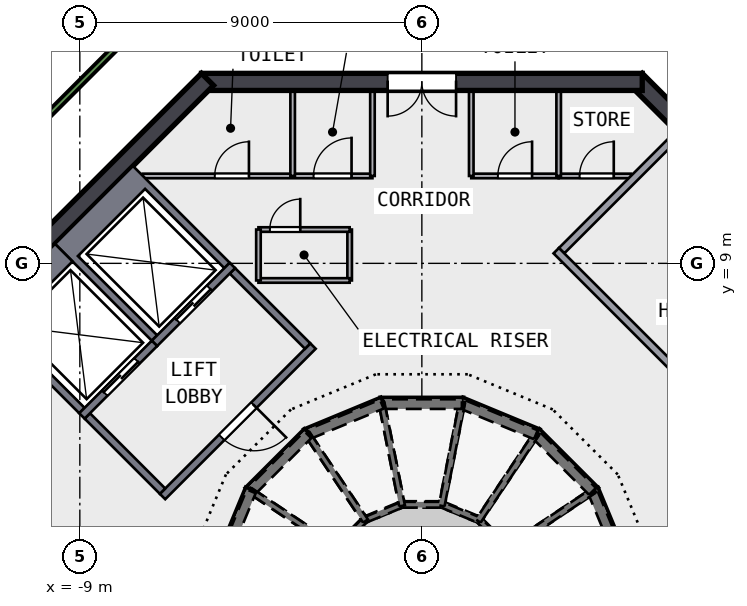
"""IFC4 building model, lengths in metres.
Left out: names, types, materials, properties, quantities, classifications, styles, units other than length and angle.
Written with IfcOpenShell. Run it as: python <this file> out.ifc"""

import sys

from ifc_helpers import new_model, si_unit, direction, frame, frame_2d, origin, place, context, subcontext, project, spatial, polyline, rectangle, outline, extrude, element, fill, save


model = new_model("IFC4")
c1 = context("Model", 3, precision=1e-05, world=origin(), true_north=direction((0.0, 1.0)))
c2 = subcontext(c1, "Body", "Model", "MODEL_VIEW")
j1 = project(units=[si_unit("LENGTHUNIT", "METRE"), si_unit("PLANEANGLEUNIT", "RADIAN")], contexts=[c1])
p1 = place(None, origin())
s1 = spatial("IfcSite", under=j1, at=p1, CompositionType="ELEMENT")
p2 = place(p1, origin())
s2 = spatial("IfcBuilding", under=s1, at=p2, CompositionType="ELEMENT")
p3 = place(p2, frame((0.0, 0.0, 315.0)))
s3 = spatial("IfcBuildingStorey", under=s2, at=p3, CompositionType="ELEMENT", Elevation=315.0)
p4 = place(p3, frame((13.841, 5.64, 0.0), z_axis=(0.0, 0.0, 1.0), x_axis=(-0.707106781, 0.707106781, 0.0)))
e1 = element("IfcWall", 1, at=p4, inside=s3, PredefinedType="SHEAR", context=c2, shape_type="SweptSolid", body=[
    extrude(rectangle(XDim=11.598, YDim=0.45, at=frame_2d((5.799, 0.0))), origin(), (0.0, 0.0, 1.0), 7.5),
])
p5 = place(p3, frame((5.799, 13.775, 0.0), z_axis=(0.0, 0.0, 1.0), x_axis=(-1.0, 0.0, 0.0)))
e2 = element("IfcWall", 2, at=p5, inside=s3, PredefinedType="SHEAR", context=c2, shape_type="SweptSolid", body=[
    extrude(rectangle(XDim=11.598, YDim=0.45, at=frame_2d((5.799, 0.0))), origin(), (0.0, 0.0, 1.0), 7.5),
])
p6 = place(p5, frame((4.899, 0.0, 0.0)))
e3 = element("IfcOpeningElement", 3, at=p6, cuts=e2, PredefinedType="OPENING", context=c2, shape_type="SweptSolid", body=[
    extrude(rectangle(XDim=1.8, YDim=2.1, at=frame_2d((0.9, 1.05))), frame((0.0, 0.235, 0.0), z_axis=(0.0, -1.0, 0.0), x_axis=(1.0, 0.0, 0.0)), (0.0, 0.0, 1.0), 0.47),
])
p7 = place(p3, frame((-5.64, 13.841, 0.0), z_axis=(0.0, 0.0, 1.0), x_axis=(-0.707106781, -0.707106781, 0.0)))
e4 = element("IfcWall", 4, at=p7, inside=s3, PredefinedType="SHEAR", context=c2, shape_type="SweptSolid", body=[
    extrude(rectangle(XDim=11.598, YDim=0.45, at=frame_2d((5.799, 0.0))), origin(), (0.0, 0.0, 1.0), 7.5),
])
p8 = place(p3, origin())
e5 = element("IfcWall", 5, at=p8, inside=s3, PredefinedType="SOLIDWALL", context=c2, shape_type="SweptSolid", body=[
    extrude(outline(polyline([(5.471, 1.088), (4.638, 3.099), (4.342, 2.901), (5.121, 1.019), (5.471, 1.088)])), origin(), (0.0, 0.0, 1.0), 1.12),
])
p9 = place(p3, origin())
e6 = element("IfcWall", 6, at=p9, inside=s3, PredefinedType="SOLIDWALL", context=c2, shape_type="SweptSolid", body=[
    extrude(outline(polyline([(4.638, 3.099), (3.099, 4.638), (2.901, 4.342), (4.342, 2.901), (4.638, 3.099)])), origin(), (0.0, 0.0, 1.0), 1.12),
])
p10 = place(p3, origin())
e7 = element("IfcWall", 7, at=p10, inside=s3, PredefinedType="SOLIDWALL", context=c2, shape_type="SweptSolid", body=[
    extrude(outline(polyline([(3.099, 4.638), (1.088, 5.471), (1.019, 5.121), (2.901, 4.342), (3.099, 4.638)])), origin(), (0.0, 0.0, 1.0), 1.12),
])
p11 = place(p3, origin())
e8 = element("IfcWall", 8, at=p11, inside=s3, PredefinedType="SOLIDWALL", context=c2, shape_type="SweptSolid", body=[
    extrude(outline(polyline([(1.088, 5.471), (-1.088, 5.471), (-1.019, 5.121), (1.019, 5.121), (1.088, 5.471)])), origin(), (0.0, 0.0, 1.0), 1.12),
])
p12 = place(p3, origin())
e9 = element("IfcWall", 9, at=p12, inside=s3, PredefinedType="SOLIDWALL", context=c2, shape_type="SweptSolid", body=[
    extrude(outline(polyline([(-1.088, 5.471), (-3.099, 4.638), (-2.901, 4.342), (-1.019, 5.121), (-1.088, 5.471)])), origin(), (0.0, 0.0, 1.0), 1.12),
])
p13 = place(p3, origin())
e10 = element("IfcWall", 10, at=p13, inside=s3, PredefinedType="SOLIDWALL", context=c2, shape_type="SweptSolid", body=[
    extrude(outline(polyline([(-3.099, 4.638), (-4.638, 3.099), (-4.342, 2.901), (-2.901, 4.342), (-3.099, 4.638)])), origin(), (0.0, 0.0, 1.0), 1.12),
])
p14 = place(p3, origin())
e11 = element("IfcWall", 11, at=p14, inside=s3, PredefinedType="SOLIDWALL", context=c2, shape_type="SweptSolid", body=[
    extrude(outline(polyline([(-4.638, 3.099), (-5.471, 1.088), (-5.121, 1.019), (-4.342, 2.901), (-4.638, 3.099)])), origin(), (0.0, 0.0, 1.0), 1.12),
])
p15 = place(p3, origin())
e12 = element("IfcWall", 12, at=p15, inside=s3, PredefinedType="SOLIDWALL", context=c2, shape_type="SweptSolid", body=[
    extrude(outline(polyline([(-10.5, 12.127), (-6.627, 16.0), (-6.689, 16.15), (-10.35, 12.49), (-10.5, 12.127)])), origin(), (0.0, 0.0, 1.0), 0.6),
])
p16 = place(p3, frame((-7.342, 11.3, 0.0), z_axis=(0.0, 0.0, 1.0), x_axis=(1.0, 0.0, 0.0)))
e13 = element("IfcWall", 13, at=p16, inside=s3, PredefinedType="PARTITIONING", context=c2, shape_type="SweptSolid", body=[
    extrude(rectangle(XDim=6.042, YDim=0.12, at=frame_2d((3.021, 0.0))), origin(), (0.0, 0.0, 1.0), 3.0),
])
p17 = place(p16, frame((1.892, 0.0, 0.0)))
e14 = element("IfcOpeningElement", 14, at=p17, cuts=e13, PredefinedType="OPENING", context=c2, shape_type="SweptSolid", body=[
    extrude(rectangle(XDim=0.9, YDim=2.1, at=frame_2d((0.45, 1.05))), frame((0.0, 0.07, 0.0), z_axis=(0.0, -1.0, 0.0), x_axis=(1.0, 0.0, 0.0)), (0.0, 0.0, 1.0), 0.14),
])
p18 = place(p16, frame((4.492, 0.0, 0.0)))
e15 = element("IfcOpeningElement", 15, at=p18, cuts=e13, PredefinedType="OPENING", context=c2, shape_type="SweptSolid", body=[
    extrude(rectangle(XDim=1.0, YDim=2.1, at=frame_2d((0.5, 1.05))), frame((0.0, 0.07, 0.0), z_axis=(0.0, -1.0, 0.0), x_axis=(1.0, 0.0, 0.0)), (0.0, 0.0, 1.0), 0.14),
])
p19 = place(p3, frame((1.3, 11.3, 0.0), z_axis=(0.0, 0.0, 1.0), x_axis=(1.0, 0.0, 0.0)))
e16 = element("IfcWall", 16, at=p19, inside=s3, PredefinedType="PARTITIONING", context=c2, shape_type="SweptSolid", body=[
    extrude(rectangle(XDim=2.3, YDim=0.12, at=frame_2d((1.15, 0.0))), origin(), (0.0, 0.0, 1.0), 3.0),
])
p20 = place(p19, frame((0.7, 0.0, 0.0)))
e17 = element("IfcOpeningElement", 17, at=p20, cuts=e16, PredefinedType="OPENING", context=c2, shape_type="SweptSolid", body=[
    extrude(rectangle(XDim=0.9, YDim=2.1, at=frame_2d((0.45, 1.05))), frame((0.0, 0.07, 0.0), z_axis=(0.0, -1.0, 0.0), x_axis=(1.0, 0.0, 0.0)), (0.0, 0.0, 1.0), 0.14),
])
p21 = place(p3, frame((3.6, 11.3, 0.0), z_axis=(0.0, 0.0, 1.0), x_axis=(1.0, 0.0, 0.0)))
e18 = element("IfcWall", 18, at=p21, inside=s3, PredefinedType="PARTITIONING", context=c2, shape_type="SweptSolid", body=[
    extrude(rectangle(XDim=1.903, YDim=0.12, at=frame_2d((0.952, 0.0))), origin(), (0.0, 0.0, 1.0), 3.0),
])
p22 = place(p21, frame((0.55, 0.0, 0.0)))
e19 = element("IfcOpeningElement", 19, at=p22, cuts=e18, PredefinedType="OPENING", context=c2, shape_type="SweptSolid", body=[
    extrude(rectangle(XDim=0.9, YDim=2.1, at=frame_2d((0.45, 1.05))), frame((0.0, 0.07, 0.0), z_axis=(0.0, -1.0, 0.0), x_axis=(1.0, 0.0, 0.0)), (0.0, 0.0, 1.0), 0.14),
])
for number, where, z_axis, x_axis in (
    (20, (-1.3, 11.3, 0.0), (0.0, 0.0, 1.0), (0.0, 1.0, 0.0)),
    (21, (1.3, 11.3, 0.0), (0.0, 0.0, 1.0), (0.0, 1.0, 0.0)),
    (22, (-3.4, 11.3, 0.0), (0.0, 0.0, 1.0), (0.0, 1.0, 0.0)),
    (23, (3.6, 11.3, 0.0), (0.0, 0.0, 1.0), (0.0, 1.0, 0.0)),
):
    element("IfcWall", number, at=place(p3, frame(where, z_axis=z_axis, x_axis=x_axis)), inside=s3, PredefinedType="PARTITIONING", context=c2, shape_type="SweptSolid", body=[
        extrude(rectangle(XDim=2.251, YDim=0.12, at=frame_2d((1.125, 0.0))), origin(), (0.0, 0.0, 1.0), 3.0),
    ])
p23 = place(p3, frame((-4.3, 9.89, 0.0), z_axis=(0.0, 0.0, 1.0), x_axis=(1.0, 0.0, 0.0)))
e24 = element("IfcWall", 24, at=p23, inside=s3, PredefinedType="PARTITIONING", context=c2, shape_type="SweptSolid", body=[
    extrude(rectangle(XDim=2.4, YDim=0.12, at=frame_2d((1.2, 0.0))), origin(), (0.0, 0.0, 1.0), 3.0),
])
p24 = place(p23, frame((0.3, 0.0, 0.0)))
e25 = element("IfcOpeningElement", 25, at=p24, cuts=e24, PredefinedType="OPENING", context=c2, shape_type="SweptSolid", body=[
    extrude(rectangle(XDim=0.8, YDim=2.1, at=frame_2d((0.4, 1.05))), frame((0.0, 0.07, 0.0), z_axis=(0.0, -1.0, 0.0), x_axis=(1.0, 0.0, 0.0)), (0.0, 0.0, 1.0), 0.14),
])
for number, where, z_axis, x_axis in (
    (26, (-4.3, 9.89, 0.0), (0.0, 0.0, 1.0), (0.0, -1.0, 0.0)),
    (27, (-1.9, 9.89, 0.0), (0.0, 0.0, 1.0), (0.0, -1.0, 0.0)),
):
    element("IfcWall", number, at=place(p3, frame(where, z_axis=z_axis, x_axis=x_axis)), inside=s3, PredefinedType="PARTITIONING", context=c2, shape_type="SweptSolid", body=[
        extrude(rectangle(XDim=1.34, YDim=0.12, at=frame_2d((0.67, 0.0))), origin(), (0.0, 0.0, 1.0), 3.0),
    ])
p25 = place(p3, frame((-4.3, 8.55, 0.0), z_axis=(0.0, 0.0, 1.0), x_axis=(1.0, 0.0, 0.0)))
e28 = element("IfcWall", 28, at=p25, inside=s3, PredefinedType="PARTITIONING", context=c2, shape_type="SweptSolid", body=[
    extrude(rectangle(XDim=2.4, YDim=0.12, at=frame_2d((1.2, 0.0))), origin(), (0.0, 0.0, 1.0), 3.0),
])
p26 = place(p3, origin())
e29 = element("IfcWall", 29, at=p26, inside=s3, PredefinedType="SOLIDWALL", context=c2, shape_type="SweptSolid", body=[
    extrude(outline(polyline([(-9.652, 9.51), (-7.601, 11.561), (-5.056, 9.016), (-5.197, 8.874), (-7.283, 10.96), (-9.051, 9.192), (-6.965, 7.106), (-7.106, 6.965), (-9.652, 9.51)])), origin(), (0.0, 0.0, 1.0), 4.8),
])
p27 = place(p3, frame((-4.985, 8.945, 0.0), z_axis=(0.0, 0.0, 1.0), x_axis=(-0.707106781, -0.707106781, 0.0)))
e30 = element("IfcWall", 30, at=p27, inside=s3, PredefinedType="SOLIDWALL", context=c2, shape_type="SweptSolid", body=[
    extrude(rectangle(XDim=2.9, YDim=0.2, at=frame_2d((1.45, 0.0))), origin(), (0.0, 0.0, 1.0), 4.8),
])
p28 = place(p27, frame((0.85, 0.0, 0.0)))
e31 = element("IfcOpeningElement", 31, at=p28, cuts=e30, PredefinedType="OPENING", context=c2, shape_type="SweptSolid", body=[
    extrude(rectangle(XDim=1.2, YDim=2.1, at=frame_2d((0.6, 1.05))), frame((0.0, 0.11, 0.0), z_axis=(0.0, -1.0, 0.0), x_axis=(1.0, 0.0, 0.0)), (0.0, 0.0, 1.0), 0.22),
])
p29 = place(p3, origin())
e32 = element("IfcWall", 32, at=p29, inside=s3, PredefinedType="SOLIDWALL", context=c2, shape_type="SweptSolid", body=[
    extrude(outline(polyline([(-11.561, 7.601), (-9.652, 9.51), (-9.192, 9.051), (-10.96, 7.283), (-8.874, 5.197), (-9.016, 5.056), (-11.561, 7.601)])), origin(), (0.0, 0.0, 1.0), 4.8),
])
p30 = place(p3, frame((-7.036, 6.894, 0.0), z_axis=(0.0, 0.0, 1.0), x_axis=(-0.707106781, -0.707106781, 0.0)))
e33 = element("IfcWall", 33, at=p30, inside=s3, PredefinedType="SOLIDWALL", context=c2, shape_type="SweptSolid", body=[
    extrude(rectangle(XDim=2.7, YDim=0.2, at=frame_2d((1.35, 0.0))), origin(), (0.0, 0.0, 1.0), 4.8),
])
p31 = place(p30, frame((0.65, 0.0, 0.0)))
e34 = element("IfcOpeningElement", 34, at=p31, cuts=e33, PredefinedType="OPENING", context=c2, shape_type="SweptSolid", body=[
    extrude(rectangle(XDim=1.2, YDim=2.1, at=frame_2d((0.6, 1.05))), frame((0.0, 0.11, 0.0), z_axis=(0.0, -1.0, 0.0), x_axis=(1.0, 0.0, 0.0)), (0.0, 0.0, 1.0), 0.22),
])
p32 = place(p3, frame((3.535, 9.334, 0.0), z_axis=(0.0, 0.0, 1.0), x_axis=(0.707106781, -0.707106781, 0.0)))
e35 = element("IfcWall", 35, at=p32, inside=s3, PredefinedType="SOLIDWALL", context=c2, shape_type="SweptSolid", body=[
    extrude(rectangle(XDim=8.2, YDim=0.2, at=frame_2d((4.1, 0.0))), origin(), (0.0, 0.0, 1.0), 3.6),
])
p33 = place(p32, frame((6.6, 0.0, 0.0)))
e36 = element("IfcOpeningElement", 36, at=p33, cuts=e35, PredefinedType="OPENING", context=c2, shape_type="SweptSolid", body=[
    extrude(rectangle(XDim=1.2, YDim=2.1, at=frame_2d((0.6, 1.05))), frame((0.0, 0.11, 0.0), z_axis=(0.0, -1.0, 0.0), x_axis=(1.0, 0.0, 0.0)), (0.0, 0.0, 1.0), 0.22),
])
p34 = place(p3, frame((3.677, 9.334, 0.0), z_axis=(0.0, 0.0, 1.0), x_axis=(0.707106781, 0.707106781, 0.0)))
e37 = element("IfcWall", 37, at=p34, inside=s3, PredefinedType="SOLIDWALL", context=c2, shape_type="SweptSolid", body=[
    extrude(rectangle(XDim=4.35, YDim=0.2, at=frame_2d((2.175, 0.0))), origin(), (0.0, 0.0, 1.0), 3.6),
])
p35 = place(p3, frame((-2.864, 6.823, 0.0), z_axis=(0.0, 0.0, 1.0), x_axis=(-0.707106781, -0.707106781, 0.0)))
e38 = element("IfcWall", 38, at=p35, inside=s3, PredefinedType="SOLIDWALL", context=c2, shape_type="SweptSolid", body=[
    extrude(rectangle(XDim=5.6, YDim=0.2, at=frame_2d((2.8, 0.0))), origin(), (0.0, 0.0, 1.0), 4.8),
])
p36 = place(p35, frame((2.2, 0.0, 0.0)))
e39 = element("IfcOpeningElement", 39, at=p36, cuts=e38, PredefinedType="OPENING", context=c2, shape_type="SweptSolid", body=[
    extrude(rectangle(XDim=1.2, YDim=2.1, at=frame_2d((0.6, 1.05))), frame((0.0, 0.11, 0.0), z_axis=(0.0, -1.0, 0.0), x_axis=(1.0, 0.0, 0.0)), (0.0, 0.0, 1.0), 0.22),
])
for number, where, z_axis, x_axis in (
    (40, (-3.005, 6.823, 0.0), (0.0, 0.0, 1.0), (-0.707, 0.707, 0.0)),
    (41, (-6.823, 3.005, 0.0), (0.0, 0.0, 1.0), (-0.707, 0.707, 0.0)),
):
    element("IfcWall", number, at=place(p3, frame(where, z_axis=z_axis, x_axis=x_axis)), inside=s3, PredefinedType="SOLIDWALL", context=c2, shape_type="SweptSolid", body=[
        extrude(rectangle(XDim=2.8, YDim=0.2, at=frame_2d((1.4, 0.0))), origin(), (0.0, 0.0, 1.0), 4.8),
    ])
p37 = place(p6, origin())
e42 = element("IfcDoor", 42, at=p37, inside=s3, OperationType="DOUBLE_DOOR_SINGLE_SWING", PredefinedType="DOOR", context=c2, shape_type="SweptSolid", body=[
    extrude(rectangle(XDim=1.8, YDim=2.1, at=frame_2d((0.9, 1.05))), frame((0.0, 0.025, 0.0), z_axis=(0.0, -1.0, 0.0), x_axis=(1.0, 0.0, 0.0)), (0.0, 0.0, 1.0), 0.05),
])
fill(e3, e42)
p38 = place(p17, origin())
e43 = element("IfcDoor", 43, at=p38, inside=s3, OperationType="SINGLE_SWING_RIGHT", PredefinedType="DOOR", context=c2, shape_type="SweptSolid", body=[
    extrude(rectangle(XDim=0.9, YDim=2.1, at=frame_2d((0.45, 1.05))), frame((0.0, 0.025, 0.0), z_axis=(0.0, -1.0, 0.0), x_axis=(1.0, 0.0, 0.0)), (0.0, 0.0, 1.0), 0.05),
])
fill(e14, e43)
p39 = place(p18, origin())
e44 = element("IfcDoor", 44, at=p39, inside=s3, OperationType="SINGLE_SWING_RIGHT", PredefinedType="DOOR", context=c2, shape_type="SweptSolid", body=[
    extrude(rectangle(XDim=1.0, YDim=2.1, at=frame_2d((0.5, 1.05))), frame((0.0, 0.025, 0.0), z_axis=(0.0, -1.0, 0.0), x_axis=(1.0, 0.0, 0.0)), (0.0, 0.0, 1.0), 0.05),
])
fill(e15, e44)
p40 = place(p20, origin())
e45 = element("IfcDoor", 45, at=p40, inside=s3, OperationType="SINGLE_SWING_RIGHT", PredefinedType="DOOR", context=c2, shape_type="SweptSolid", body=[
    extrude(rectangle(XDim=0.9, YDim=2.1, at=frame_2d((0.45, 1.05))), frame((0.0, 0.025, 0.0), z_axis=(0.0, -1.0, 0.0), x_axis=(1.0, 0.0, 0.0)), (0.0, 0.0, 1.0), 0.05),
])
fill(e17, e45)
p41 = place(p22, origin())
e46 = element("IfcDoor", 46, at=p41, inside=s3, OperationType="SINGLE_SWING_RIGHT", PredefinedType="DOOR", context=c2, shape_type="SweptSolid", body=[
    extrude(rectangle(XDim=0.9, YDim=2.1, at=frame_2d((0.45, 1.05))), frame((0.0, 0.025, 0.0), z_axis=(0.0, -1.0, 0.0), x_axis=(1.0, 0.0, 0.0)), (0.0, 0.0, 1.0), 0.05),
])
fill(e19, e46)
p42 = place(p24, origin())
e47 = element("IfcDoor", 47, at=p42, inside=s3, OperationType="SINGLE_SWING_RIGHT", PredefinedType="DOOR", context=c2, shape_type="SweptSolid", body=[
    extrude(rectangle(XDim=0.8, YDim=2.1, at=frame_2d((0.4, 1.05))), frame((0.0, 0.025, 0.0), z_axis=(0.0, -1.0, 0.0), x_axis=(1.0, 0.0, 0.0)), (0.0, 0.0, 1.0), 0.05),
])
fill(e25, e47)
p43 = place(p28, origin())
e48 = element("IfcDoor", 48, at=p43, inside=s3, OperationType="DOUBLE_DOOR_SLIDING", PredefinedType="DOOR", context=c2, shape_type="SweptSolid", body=[
    extrude(rectangle(XDim=1.2, YDim=2.1, at=frame_2d((0.6, 1.05))), frame((0.0, 0.025, 0.0), z_axis=(0.0, -1.0, 0.0), x_axis=(1.0, 0.0, 0.0)), (0.0, 0.0, 1.0), 0.05),
])
fill(e31, e48)
p44 = place(p31, origin())
e49 = element("IfcDoor", 49, at=p44, inside=s3, OperationType="DOUBLE_DOOR_SLIDING", PredefinedType="DOOR", context=c2, shape_type="SweptSolid", body=[
    extrude(rectangle(XDim=1.2, YDim=2.1, at=frame_2d((0.6, 1.05))), frame((0.0, 0.025, 0.0), z_axis=(0.0, -1.0, 0.0), x_axis=(1.0, 0.0, 0.0)), (0.0, 0.0, 1.0), 0.05),
])
fill(e34, e49)
p45 = place(p36, origin())
e50 = element("IfcDoor", 50, at=p45, inside=s3, OperationType="SINGLE_SWING_LEFT", PredefinedType="DOOR", context=c2, shape_type="SweptSolid", body=[
    extrude(rectangle(XDim=1.2, YDim=2.1, at=frame_2d((0.6, 1.05))), frame((0.0, 0.025, 0.0), z_axis=(0.0, -1.0, 0.0), x_axis=(1.0, 0.0, 0.0)), (0.0, 0.0, 1.0), 0.05),
])
fill(e39, e50)
save(model, sys.argv[1])
